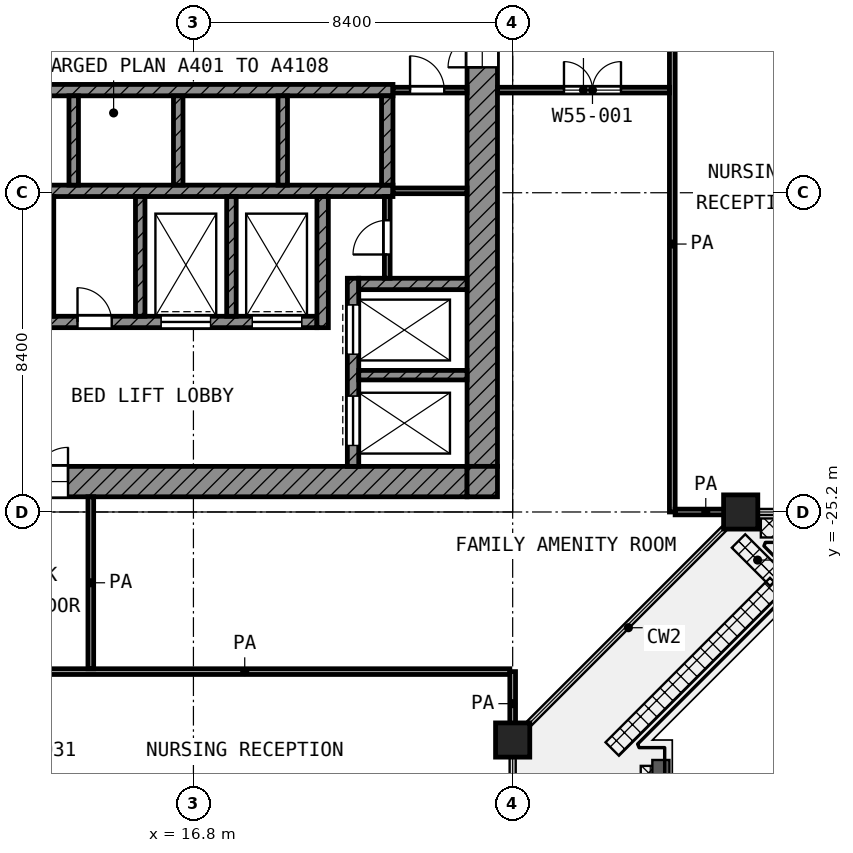
"""IFC4 building model, lengths in metres.
Left out: names, types, materials, properties, quantities, classifications, styles, units other than length and angle.
Written with IfcOpenShell. Run it as: python <this file> out.ifc"""

import sys

from ifc_helpers import new_model, si_unit, direction, frame, frame_2d, origin, origin_2d, place, context, subcontext, project, spatial, rectangle, extrude, element, fill, save


model = new_model("IFC4")
c1 = context("Model", 3, precision=1e-05, world=origin(), true_north=direction((0.0, 1.0)))
c2 = subcontext(c1, "Body", "Model", "MODEL_VIEW")
j1 = project(units=[si_unit("LENGTHUNIT", "METRE"), si_unit("PLANEANGLEUNIT", "RADIAN")], contexts=[c1])
p1 = place(None, origin())
s1 = spatial("IfcSite", under=j1, at=p1, CompositionType="ELEMENT")
p2 = place(p1, origin())
s2 = spatial("IfcBuilding", under=s1, at=p2, CompositionType="ELEMENT")
p3 = place(p2, frame((0.0, 0.0, 239.0)))
s3 = spatial("IfcBuildingStorey", under=s2, at=p3, CompositionType="ELEMENT", Elevation=239.0)
for number, where, z_axis, x_axis in (
    (1, (31.2, -25.2, 0.0), (0.0, 0.0, 1.0), (1.0, 0.0, 0.0)),
    (2, (25.2, -31.2, 0.0), (0.0, 0.0, 1.0), (1.0, 0.0, 0.0)),
):
    element("IfcColumn", number, at=place(p3, frame(where, z_axis=z_axis, x_axis=x_axis)), inside=s3, PredefinedType="COLUMN", context=c2, shape_type="SweptSolid", body=[
        extrude(rectangle(XDim=0.9, YDim=0.9, at=origin_2d()), origin(), (0.0, 0.0, 1.0), 4.2),
    ])
p4 = place(p3, frame((24.4, -24.0, 0.0), z_axis=(0.0, 0.0, 1.0), x_axis=(0.0, 1.0, 0.0)))
e3 = element("IfcWall", 3, at=p4, inside=s3, PredefinedType="SHEAR", context=c2, shape_type="SweptSolid", body=[
    extrude(rectangle(XDim=18.6, YDim=0.8, at=frame_2d((9.3, 0.0))), origin(), (0.0, 0.0, 1.0), 3.6),
])
p5 = place(p4, frame((10.5, 0.0, 0.0)))
e4 = element("IfcOpeningElement", 4, at=p5, cuts=e3, PredefinedType="OPENING", context=c2, shape_type="SweptSolid", body=[
    extrude(rectangle(XDim=1.8, YDim=2.1, at=frame_2d((0.9, 1.05))), frame((0.0, 0.41, 0.0), z_axis=(0.0, -1.0, 0.0), x_axis=(1.0, 0.0, 0.0)), (0.0, 0.0, 1.0), 0.82),
])
p6 = place(p3, frame((5.4, -24.4, 0.0), z_axis=(0.0, 0.0, 1.0), x_axis=(1.0, 0.0, 0.0)))
e5 = element("IfcWall", 5, at=p6, inside=s3, PredefinedType="SHEAR", context=c2, shape_type="SweptSolid", body=[
    extrude(rectangle(XDim=18.6, YDim=0.8, at=frame_2d((9.3, 0.0))), origin(), (0.0, 0.0, 1.0), 3.6),
])
p7 = place(p6, frame((6.3, 0.0, 0.0)))
e6 = element("IfcOpeningElement", 6, at=p7, cuts=e5, PredefinedType="OPENING", context=c2, shape_type="SweptSolid", body=[
    extrude(rectangle(XDim=1.8, YDim=2.1, at=frame_2d((0.9, 1.05))), frame((0.0, 0.41, 0.0), z_axis=(0.0, -1.0, 0.0), x_axis=(1.0, 0.0, 0.0)), (0.0, 0.0, 1.0), 0.82),
])
p8 = place(p3, frame((24.4, -24.8, 0.0), z_axis=(0.0, 0.0, 1.0), x_axis=(0.0, 1.0, 0.0)))
e7 = element("IfcWall", 7, at=p8, inside=s3, PredefinedType="SHEAR", context=c2, shape_type="SweptSolid", body=[
    extrude(rectangle(XDim=0.8, YDim=0.8, at=frame_2d((0.4, 0.0))), origin(), (0.0, 0.0, 1.0), 3.6),
])
p9 = place(p3, frame((5.4, -14.1, 0.0), z_axis=(0.0, 0.0, 1.0), x_axis=(1.0, 0.0, 0.0)))
e8 = element("IfcWall", 8, at=p9, inside=s3, PredefinedType="SHEAR", context=c2, shape_type="SweptSolid", body=[
    extrude(rectangle(XDim=16.65, YDim=0.3, at=frame_2d((8.325, 0.0))), origin(), (0.0, 0.0, 1.0), 3.6),
])
p10 = place(p9, frame((0.825, 0.0, 0.0)))
e9 = element("IfcOpeningElement", 9, at=p10, cuts=e8, PredefinedType="OPENING", context=c2, shape_type="SweptSolid", body=[
    extrude(rectangle(XDim=1.1, YDim=2.1, at=frame_2d((0.55, 1.05))), frame((0.0, 0.16, 0.0), z_axis=(0.0, -1.0, 0.0), x_axis=(1.0, 0.0, 0.0)), (0.0, 0.0, 1.0), 0.32),
])
p11 = place(p9, frame((3.575, 0.0, 0.0)))
e10 = element("IfcOpeningElement", 10, at=p11, cuts=e8, PredefinedType="OPENING", context=c2, shape_type="SweptSolid", body=[
    extrude(rectangle(XDim=1.1, YDim=2.1, at=frame_2d((0.55, 1.05))), frame((0.0, 0.16, 0.0), z_axis=(0.0, -1.0, 0.0), x_axis=(1.0, 0.0, 0.0)), (0.0, 0.0, 1.0), 0.32),
])
p12 = place(p3, frame((5.4, -16.75, 0.0), z_axis=(0.0, 0.0, 1.0), x_axis=(1.0, 0.0, 0.0)))
e11 = element("IfcWall", 11, at=p12, inside=s3, PredefinedType="SHEAR", context=c2, shape_type="SweptSolid", body=[
    extrude(rectangle(XDim=16.65, YDim=0.3, at=frame_2d((8.325, 0.0))), origin(), (0.0, 0.0, 1.0), 3.6),
])
p13 = place(p3, frame((5.4, -20.2, 0.0), z_axis=(0.0, 0.0, 1.0), x_axis=(1.0, 0.0, 0.0)))
e12 = element("IfcWall", 12, at=p13, inside=s3, PredefinedType="SHEAR", context=c2, shape_type="SweptSolid", body=[
    extrude(rectangle(XDim=14.65, YDim=0.3, at=frame_2d((7.325, 0.0))), origin(), (0.0, 0.0, 1.0), 3.6),
])
p14 = place(p13, frame((10.55, 0.0, 0.0)))
e13 = element("IfcOpeningElement", 13, at=p14, cuts=e12, PredefinedType="OPENING", context=c2, shape_type="SweptSolid", body=[
    extrude(rectangle(XDim=1.3, YDim=2.1, at=frame_2d((0.65, 1.05))), frame((0.0, 0.16, 0.0), z_axis=(0.0, -1.0, 0.0), x_axis=(1.0, 0.0, 0.0)), (0.0, 0.0, 1.0), 0.32),
])
p15 = place(p13, frame((12.95, 0.0, 0.0)))
e14 = element("IfcOpeningElement", 14, at=p15, cuts=e12, PredefinedType="OPENING", context=c2, shape_type="SweptSolid", body=[
    extrude(rectangle(XDim=1.3, YDim=2.1, at=frame_2d((0.65, 1.05))), frame((0.0, 0.16, 0.0), z_axis=(0.0, -1.0, 0.0), x_axis=(1.0, 0.0, 0.0)), (0.0, 0.0, 1.0), 0.32),
])
p16 = place(p13, frame((0.55, 0.0, 0.0)))
e15 = element("IfcOpeningElement", 15, at=p16, cuts=e12, PredefinedType="OPENING", context=c2, shape_type="SweptSolid", body=[
    extrude(rectangle(XDim=1.3, YDim=2.1, at=frame_2d((0.65, 1.05))), frame((0.0, 0.16, 0.0), z_axis=(0.0, -1.0, 0.0), x_axis=(1.0, 0.0, 0.0)), (0.0, 0.0, 1.0), 0.32),
])
p17 = place(p13, frame((2.95, 0.0, 0.0)))
e16 = element("IfcOpeningElement", 16, at=p17, cuts=e12, PredefinedType="OPENING", context=c2, shape_type="SweptSolid", body=[
    extrude(rectangle(XDim=1.3, YDim=2.1, at=frame_2d((0.65, 1.05))), frame((0.0, 0.16, 0.0), z_axis=(0.0, -1.0, 0.0), x_axis=(1.0, 0.0, 0.0)), (0.0, 0.0, 1.0), 0.32),
])
p18 = place(p13, frame((5.95, 0.0, 0.0)))
e17 = element("IfcOpeningElement", 17, at=p18, cuts=e12, PredefinedType="OPENING", context=c2, shape_type="SweptSolid", body=[
    extrude(rectangle(XDim=0.9, YDim=2.1, at=frame_2d((0.45, 1.05))), frame((0.0, 0.16, 0.0), z_axis=(0.0, -1.0, 0.0), x_axis=(1.0, 0.0, 0.0)), (0.0, 0.0, 1.0), 0.32),
])
p19 = place(p13, frame((8.35, 0.0, 0.0)))
e18 = element("IfcOpeningElement", 18, at=p19, cuts=e12, PredefinedType="OPENING", context=c2, shape_type="SweptSolid", body=[
    extrude(rectangle(XDim=0.9, YDim=2.1, at=frame_2d((0.45, 1.05))), frame((0.0, 0.16, 0.0), z_axis=(0.0, -1.0, 0.0), x_axis=(1.0, 0.0, 0.0)), (0.0, 0.0, 1.0), 0.32),
])
p20 = place(p3, frame((20.2, -20.35, 0.0), z_axis=(0.0, 0.0, 1.0), x_axis=(0.0, 1.0, 0.0)))
e19 = element("IfcWall", 19, at=p20, inside=s3, PredefinedType="SHEAR", context=c2, shape_type="SweptSolid", body=[
    extrude(rectangle(XDim=3.45, YDim=0.3, at=frame_2d((1.725, 0.0))), origin(), (0.0, 0.0, 1.0), 3.6),
])
p21 = place(p3, frame((21.9, -16.6, 0.0), z_axis=(0.0, 0.0, 1.0), x_axis=(0.0, 1.0, 0.0)))
e20 = element("IfcWall", 20, at=p21, inside=s3, PredefinedType="SHEAR", context=c2, shape_type="SweptSolid", body=[
    extrude(rectangle(XDim=2.35, YDim=0.3, at=frame_2d((1.175, 0.0))), origin(), (0.0, 0.0, 1.0), 3.6),
])
p22 = place(p3, frame((21.15, -19.2, 0.0), z_axis=(0.0, 0.0, 1.0), x_axis=(1.0, 0.0, 0.0)))
e21 = element("IfcWall", 21, at=p22, inside=s3, PredefinedType="SHEAR", context=c2, shape_type="SweptSolid", body=[
    extrude(rectangle(XDim=2.85, YDim=0.3, at=frame_2d((1.425, 0.0))), origin(), (0.0, 0.0, 1.0), 3.6),
])
p23 = place(p3, frame((21.0, -24.0, 0.0), z_axis=(0.0, 0.0, 1.0), x_axis=(0.0, 1.0, 0.0)))
e22 = element("IfcWall", 22, at=p23, inside=s3, PredefinedType="SHEAR", context=c2, shape_type="SweptSolid", body=[
    extrude(rectangle(XDim=4.95, YDim=0.3, at=frame_2d((2.475, 0.0))), origin(), (0.0, 0.0, 1.0), 3.6),
])
p24 = place(p23, frame((2.95, 0.0, 0.0)))
e23 = element("IfcOpeningElement", 23, at=p24, cuts=e22, PredefinedType="OPENING", context=c2, shape_type="SweptSolid", body=[
    extrude(rectangle(XDim=1.3, YDim=2.1, at=frame_2d((0.65, 1.05))), frame((0.0, 0.16, 0.0), z_axis=(0.0, -1.0, 0.0), x_axis=(1.0, 0.0, 0.0)), (0.0, 0.0, 1.0), 0.32),
])
p25 = place(p23, frame((0.55, 0.0, 0.0)))
e24 = element("IfcOpeningElement", 24, at=p25, cuts=e22, PredefinedType="OPENING", context=c2, shape_type="SweptSolid", body=[
    extrude(rectangle(XDim=1.3, YDim=2.1, at=frame_2d((0.65, 1.05))), frame((0.0, 0.16, 0.0), z_axis=(0.0, -1.0, 0.0), x_axis=(1.0, 0.0, 0.0)), (0.0, 0.0, 1.0), 0.32),
])
p26 = place(p3, frame((21.15, -21.6, 0.0), z_axis=(0.0, 0.0, 1.0), x_axis=(1.0, 0.0, 0.0)))
e25 = element("IfcWall", 25, at=p26, inside=s3, PredefinedType="SHEAR", context=c2, shape_type="SweptSolid", body=[
    extrude(rectangle(XDim=2.85, YDim=0.25, at=frame_2d((1.425, 0.0))), origin(), (0.0, 0.0, 1.0), 3.6),
])
for number, where, z_axis, x_axis in (
    (26, (13.0, -20.05, 0.0), (0.0, 0.0, 1.0), (0.0, 1.0, 0.0)),
    (27, (15.4, -20.05, 0.0), (0.0, 0.0, 1.0), (0.0, 1.0, 0.0)),
    (28, (17.8, -20.05, 0.0), (0.0, 0.0, 1.0), (0.0, 1.0, 0.0)),
):
    element("IfcWall", number, at=place(p3, frame(where, z_axis=z_axis, x_axis=x_axis)), inside=s3, PredefinedType="SHEAR", context=c2, shape_type="SweptSolid", body=[
        extrude(rectangle(XDim=3.15, YDim=0.25, at=frame_2d((1.575, 0.0))), origin(), (0.0, 0.0, 1.0), 3.6),
    ])
for number, where, z_axis, x_axis in (
    (29, (13.65, -16.6, 0.0), (0.0, 0.0, 1.0), (0.0, 1.0, 0.0)),
    (30, (16.4, -16.6, 0.0), (0.0, 0.0, 1.0), (0.0, 1.0, 0.0)),
    (31, (19.15, -16.6, 0.0), (0.0, 0.0, 1.0), (0.0, 1.0, 0.0)),
):
    element("IfcWall", number, at=place(p3, frame(where, z_axis=z_axis, x_axis=x_axis)), inside=s3, PredefinedType="SHEAR", context=c2, shape_type="SweptSolid", body=[
        extrude(rectangle(XDim=2.35, YDim=0.25, at=frame_2d((1.175, 0.0))), origin(), (0.0, 0.0, 1.0), 3.6),
    ])
p27 = place(p3, frame((21.9, -19.05, 0.0), z_axis=(0.0, 0.0, 1.0), x_axis=(0.0, 1.0, 0.0)))
e32 = element("IfcWall", 32, at=p27, inside=s3, PredefinedType="PARTITIONING", context=c2, shape_type="SweptSolid", body=[
    extrude(rectangle(XDim=2.15, YDim=0.15, at=frame_2d((1.075, 0.0))), origin(), (0.0, 0.0, 1.0), 3.6),
])
p28 = place(p27, frame((0.625, 0.0, 0.0)))
e33 = element("IfcOpeningElement", 33, at=p28, cuts=e32, PredefinedType="OPENING", context=c2, shape_type="SweptSolid", body=[
    extrude(rectangle(XDim=0.9, YDim=2.1, at=frame_2d((0.45, 1.05))), frame((0.0, 0.085, 0.0), z_axis=(0.0, -1.0, 0.0), x_axis=(1.0, 0.0, 0.0)), (0.0, 0.0, 1.0), 0.17),
])
p29 = place(p3, frame((22.05, -16.75, 0.0), z_axis=(0.0, 0.0, 1.0), x_axis=(1.0, 0.0, 0.0)))
e34 = element("IfcWall", 34, at=p29, inside=s3, PredefinedType="PARTITIONING", context=c2, shape_type="SweptSolid", body=[
    extrude(rectangle(XDim=1.95, YDim=0.15, at=frame_2d((0.975, 0.0))), origin(), (0.0, 0.0, 1.0), 3.6),
])
p30 = place(p3, frame((22.05, -14.1, 0.0), z_axis=(0.0, 0.0, 1.0), x_axis=(1.0, 0.0, 0.0)))
e35 = element("IfcWall", 35, at=p30, inside=s3, PredefinedType="PARTITIONING", context=c2, shape_type="SweptSolid", body=[
    extrude(rectangle(XDim=1.95, YDim=0.15, at=frame_2d((0.975, 0.0))), origin(), (0.0, 0.0, 1.0), 3.6),
])
p31 = place(p30, frame((0.45, 0.0, 0.0)))
e36 = element("IfcOpeningElement", 36, at=p31, cuts=e35, PredefinedType="OPENING", context=c2, shape_type="SweptSolid", body=[
    extrude(rectangle(XDim=0.9, YDim=2.1, at=frame_2d((0.45, 1.05))), frame((0.0, 0.085, 0.0), z_axis=(0.0, -1.0, 0.0), x_axis=(1.0, 0.0, 0.0)), (0.0, 0.0, 1.0), 0.17),
])
p32 = place(p3, frame((11.175, -29.4, 0.0), z_axis=(0.0, 0.0, 1.0), x_axis=(1.0, 0.0, 0.0)))
e37 = element("IfcWall", 37, at=p32, inside=s3, PredefinedType="PARTITIONING", context=c2, shape_type="SweptSolid", body=[
    extrude(rectangle(XDim=13.95, YDim=0.15, at=frame_2d((6.975, 0.0))), origin(), (0.0, 0.0, 1.0), 3.6),
])
p33 = place(p3, frame((29.475, -25.2, 0.0), z_axis=(0.0, 0.0, 1.0), x_axis=(1.0, 0.0, 0.0)))
e38 = element("IfcWall", 38, at=p33, inside=s3, PredefinedType="PARTITIONING", context=c2, shape_type="SweptSolid", body=[
    extrude(rectangle(XDim=1.612, YDim=0.15, at=frame_2d((0.806, 0.0))), origin(), (0.0, 0.0, 1.0), 3.6),
])
p34 = place(p3, frame((24.8, -14.1, 0.0), z_axis=(0.0, 0.0, 1.0), x_axis=(1.0, 0.0, 0.0)))
e39 = element("IfcWall", 39, at=p34, inside=s3, PredefinedType="PARTITIONING", context=c2, shape_type="SweptSolid", body=[
    extrude(rectangle(XDim=4.525, YDim=0.15, at=frame_2d((2.262, 0.0))), origin(), (0.0, 0.0, 1.0), 3.6),
])
p35 = place(p34, frame((1.75, 0.0, 0.0)))
e40 = element("IfcOpeningElement", 40, at=p35, cuts=e39, PredefinedType="OPENING", context=c2, shape_type="SweptSolid", body=[
    extrude(rectangle(XDim=1.5, YDim=2.1, at=frame_2d((0.75, 1.05))), frame((0.0, 0.085, 0.0), z_axis=(0.0, -1.0, 0.0), x_axis=(1.0, 0.0, 0.0)), (0.0, 0.0, 1.0), 0.17),
])
p36 = place(p3, frame((14.1, -29.325, 0.0), z_axis=(0.0, 0.0, 1.0), x_axis=(0.0, 1.0, 0.0)))
e41 = element("IfcWall", 41, at=p36, inside=s3, PredefinedType="PARTITIONING", context=c2, shape_type="SweptSolid", body=[
    extrude(rectangle(XDim=4.525, YDim=0.15, at=frame_2d((2.262, 0.0))), origin(), (0.0, 0.0, 1.0), 3.6),
])
p37 = place(p3, frame((25.2, -31.087, 0.0), z_axis=(0.0, 0.0, 1.0), x_axis=(0.0, 1.0, 0.0)))
e42 = element("IfcWall", 42, at=p37, inside=s3, PredefinedType="PARTITIONING", context=c2, shape_type="SweptSolid", body=[
    extrude(rectangle(XDim=1.687, YDim=0.15, at=frame_2d((0.844, 0.0))), origin(), (0.0, 0.0, 1.0), 3.6),
])
p38 = place(p3, frame((29.4, -25.2, 0.0), z_axis=(0.0, 0.0, 1.0), x_axis=(0.0, 1.0, 0.0)))
e43 = element("IfcWall", 43, at=p38, inside=s3, PredefinedType="PARTITIONING", context=c2, shape_type="SweptSolid", body=[
    extrude(rectangle(XDim=14.1, YDim=0.15, at=frame_2d((7.05, 0.0))), origin(), (0.0, 0.0, 1.0), 3.6),
])
p39 = place(p24, origin())
e44 = element("IfcDoor", 44, at=p39, inside=s3, OperationType="DOUBLE_DOOR_SLIDING", PredefinedType="DOOR", context=c2, shape_type="SweptSolid", body=[
    extrude(rectangle(XDim=1.3, YDim=2.1, at=frame_2d((0.65, 1.05))), frame((0.0, 0.025, 0.0), z_axis=(0.0, -1.0, 0.0), x_axis=(1.0, 0.0, 0.0)), (0.0, 0.0, 1.0), 0.05),
])
fill(e23, e44)
p40 = place(p25, origin())
e45 = element("IfcDoor", 45, at=p40, inside=s3, OperationType="DOUBLE_DOOR_SLIDING", PredefinedType="DOOR", context=c2, shape_type="SweptSolid", body=[
    extrude(rectangle(XDim=1.3, YDim=2.1, at=frame_2d((0.65, 1.05))), frame((0.0, 0.025, 0.0), z_axis=(0.0, -1.0, 0.0), x_axis=(1.0, 0.0, 0.0)), (0.0, 0.0, 1.0), 0.05),
])
fill(e24, e45)
p41 = place(p14, origin())
e46 = element("IfcDoor", 46, at=p41, inside=s3, OperationType="DOUBLE_DOOR_SLIDING", PredefinedType="DOOR", context=c2, shape_type="SweptSolid", body=[
    extrude(rectangle(XDim=1.3, YDim=2.1, at=frame_2d((0.65, 1.05))), frame((0.0, 0.025, 0.0), z_axis=(0.0, -1.0, 0.0), x_axis=(1.0, 0.0, 0.0)), (0.0, 0.0, 1.0), 0.05),
])
fill(e13, e46)
p42 = place(p15, origin())
e47 = element("IfcDoor", 47, at=p42, inside=s3, OperationType="DOUBLE_DOOR_SLIDING", PredefinedType="DOOR", context=c2, shape_type="SweptSolid", body=[
    extrude(rectangle(XDim=1.3, YDim=2.1, at=frame_2d((0.65, 1.05))), frame((0.0, 0.025, 0.0), z_axis=(0.0, -1.0, 0.0), x_axis=(1.0, 0.0, 0.0)), (0.0, 0.0, 1.0), 0.05),
])
fill(e14, e47)
p43 = place(p5, origin())
e48 = element("IfcDoor", 48, at=p43, inside=s3, OperationType="DOUBLE_DOOR_SINGLE_SWING", PredefinedType="DOOR", context=c2, shape_type="SweptSolid", body=[
    extrude(rectangle(XDim=1.8, YDim=2.1, at=frame_2d((0.9, 1.05))), frame((0.0, 0.025, 0.0), z_axis=(0.0, -1.0, 0.0), x_axis=(1.0, 0.0, 0.0)), (0.0, 0.0, 1.0), 0.05),
])
fill(e4, e48)
p44 = place(p7, origin())
e49 = element("IfcDoor", 49, at=p44, inside=s3, OperationType="DOUBLE_DOOR_SINGLE_SWING", PredefinedType="DOOR", context=c2, shape_type="SweptSolid", body=[
    extrude(rectangle(XDim=1.8, YDim=2.1, at=frame_2d((0.9, 1.05))), frame((0.0, 0.025, 0.0), z_axis=(0.0, -1.0, 0.0), x_axis=(1.0, 0.0, 0.0)), (0.0, 0.0, 1.0), 0.05),
])
fill(e6, e49)
p45 = place(p31, origin())
e50 = element("IfcDoor", 50, at=p45, inside=s3, OperationType="SINGLE_SWING_LEFT", PredefinedType="DOOR", context=c2, shape_type="SweptSolid", body=[
    extrude(rectangle(XDim=0.9, YDim=2.1, at=frame_2d((0.45, 1.05))), frame((0.0, 0.025, 0.0), z_axis=(0.0, -1.0, 0.0), x_axis=(1.0, 0.0, 0.0)), (0.0, 0.0, 1.0), 0.05),
])
fill(e36, e50)
p46 = place(p28, origin())
e51 = element("IfcDoor", 51, at=p46, inside=s3, OperationType="SINGLE_SWING_LEFT", PredefinedType="DOOR", context=c2, shape_type="SweptSolid", body=[
    extrude(rectangle(XDim=0.9, YDim=2.1, at=frame_2d((0.45, 1.05))), frame((0.0, 0.025, 0.0), z_axis=(0.0, -1.0, 0.0), x_axis=(1.0, 0.0, 0.0)), (0.0, 0.0, 1.0), 0.05),
])
fill(e33, e51)
p47 = place(p19, origin())
e52 = element("IfcDoor", 52, at=p47, inside=s3, OperationType="SINGLE_SWING_LEFT", PredefinedType="DOOR", context=c2, shape_type="SweptSolid", body=[
    extrude(rectangle(XDim=0.9, YDim=2.1, at=frame_2d((0.45, 1.05))), frame((0.0, 0.025, 0.0), z_axis=(0.0, -1.0, 0.0), x_axis=(1.0, 0.0, 0.0)), (0.0, 0.0, 1.0), 0.05),
])
fill(e18, e52)
p48 = place(p35, origin())
e53 = element("IfcDoor", 53, at=p48, inside=s3, OperationType="DOUBLE_DOOR_SINGLE_SWING", PredefinedType="DOOR", context=c2, shape_type="SweptSolid", body=[
    extrude(rectangle(XDim=1.5, YDim=2.1, at=frame_2d((0.75, 1.05))), frame((0.0, 0.025, 0.0), z_axis=(0.0, -1.0, 0.0), x_axis=(1.0, 0.0, 0.0)), (0.0, 0.0, 1.0), 0.05),
])
fill(e40, e53)
save(model, sys.argv[1])
